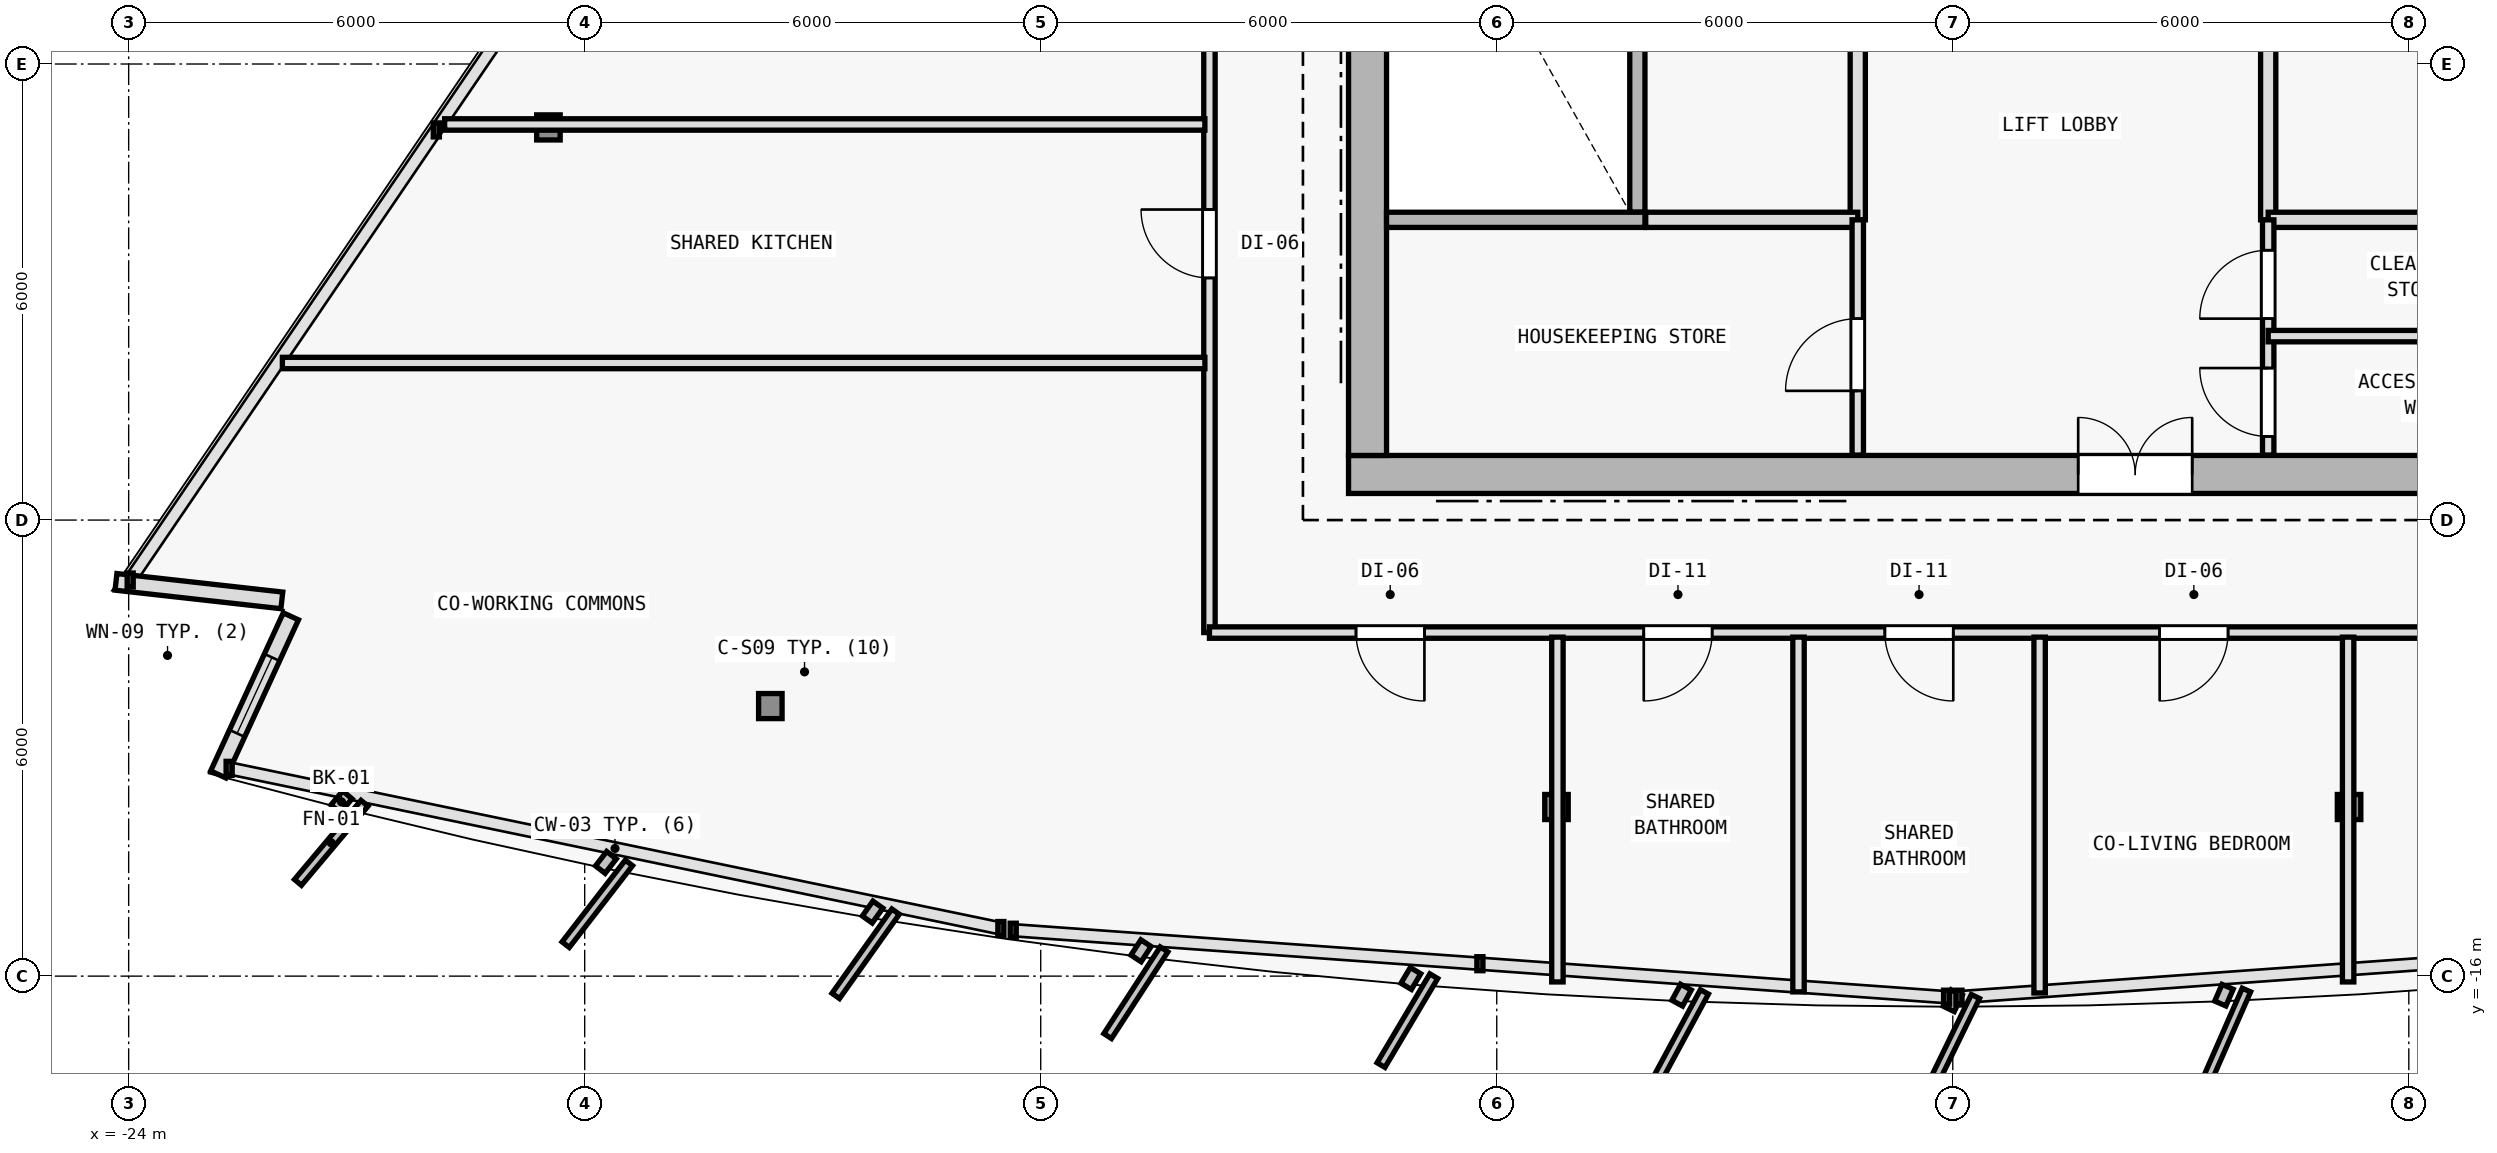
"""IFC4 building model, lengths in metres.
Left out: names, types, materials, properties, quantities, classifications, styles, units other than length and angle.
Written with IfcOpenShell. Run it as: python <this file> out.ifc"""

import sys

from ifc_helpers import new_model, si_unit, direction, frame, frame_2d, origin, origin_2d, place, context, subcontext, project, spatial, rectangle, i_section, extrude, element, fill, save


model = new_model("IFC4")
c1 = context("Model", 3, precision=1e-05, world=origin(), true_north=direction((0.0, 1.0)))
c2 = subcontext(c1, "Body", "Model", "MODEL_VIEW")
j1 = project(units=[si_unit("LENGTHUNIT", "METRE"), si_unit("PLANEANGLEUNIT", "RADIAN")], contexts=[c1])
p1 = place(None, origin())
s1 = spatial("IfcSite", under=j1, at=p1, CompositionType="ELEMENT")
p2 = place(p1, origin())
s2 = spatial("IfcBuilding", under=s1, at=p2, CompositionType="ELEMENT")
p3 = place(p2, frame((0.0, 0.0, 268.8)))
s3 = spatial("IfcBuildingStorey", under=s2, at=p3, CompositionType="ELEMENT", Elevation=268.8)
for number, where, z_axis, x_axis in (
    (1, (-7.7, -9.4, 0.0), (0.0, 0.0, 1.0), (1.0, 0.0, 0.0)),
    (2, (0.0, -9.4, 0.0), (0.0, 0.0, 1.0), (1.0, 0.0, 0.0)),
):
    element("IfcColumn", number, at=place(p3, frame(where, z_axis=z_axis, x_axis=x_axis)), inside=s3, PredefinedType="COLUMN", context=c2, shape_type="SweptSolid", body=[
        extrude(i_section(OverallWidth=0.374, OverallDepth=0.372, WebThickness=0.012, FlangeThickness=0.02, FilletRadius=0.015, at=origin_2d()), origin(), (0.0, 0.0, 1.0), 3.6),
    ])
p4 = place(p3, frame((-15.558, -12.447, 0.005), z_axis=(0.020662881976, 0.033441243198, 0.999227065567), x_axis=(-0.850707037426, 0.525640120686, 0.0)))
e3 = element("IfcColumn", 3, at=p4, inside=s3, PredefinedType="COLUMN", context=c2, shape_type="SweptSolid", body=[
    extrude(i_section(OverallWidth=0.309, OverallDepth=0.33, WebThickness=0.011, FlangeThickness=0.019, FilletRadius=0.027, at=origin_2d()), origin(), (0.0, 0.0, 1.0), 3.592),
])
for number, where, z_axis, x_axis in (
    (4, (-5.214, -13.775, 0.005), (0.007, 0.035, 0.999), (-0.981, 0.193, 0.0)),
    (5, (5.214, -13.775, 0.005), (-0.007, 0.035, 0.999), (-0.981, -0.193, 0.0)),
):
    element("IfcColumn", number, at=place(p3, frame(where, z_axis=z_axis, x_axis=x_axis)), inside=s3, PredefinedType="COLUMN", context=c2, shape_type="SweptSolid", body=[
        extrude(i_section(OverallWidth=0.309, OverallDepth=0.33, WebThickness=0.011, FlangeThickness=0.019, FilletRadius=0.027, at=origin_2d()), origin(), (0.0, 0.0, 1.0), 3.592),
    ])
p5 = place(p3, frame((-18.477, -4.834, 0.005), z_axis=(0.025222449659, 0.021619242565, 0.999448065876), x_axis=(-0.650791373456, 0.759256602365, 0.0)))
e6 = element("IfcColumn", 6, at=p5, inside=s3, PredefinedType="COLUMN", context=c2, shape_type="SweptSolid", body=[
    extrude(i_section(OverallWidth=0.309, OverallDepth=0.33, WebThickness=0.011, FlangeThickness=0.019, FilletRadius=0.027, at=origin_2d()), origin(), (0.0, 0.0, 1.0), 3.591),
])
p6 = place(p3, frame((-21.985, -11.057, 0.0), z_axis=(0.0, 0.0, 1.0), x_axis=(-0.993823926228, 0.110968480463, 0.0)))
e7 = element("IfcWall", 7, at=p6, inside=s3, PredefinedType="SOLIDWALL", context=c2, shape_type="SweptSolid", body=[
    extrude(rectangle(XDim=2.196, YDim=0.22, at=frame_2d((1.098, 0.0))), origin(), (0.0, 0.0, 1.0), 3.35),
])
p7 = place(p3, frame((-22.822, -13.347, 0.0), z_axis=(0.0, 0.0, 1.0), x_axis=(0.417447808253, 0.908700900949, 0.0)))
e8 = element("IfcWall", 8, at=p7, inside=s3, PredefinedType="SOLIDWALL", context=c2, shape_type="SweptSolid", body=[
    extrude(rectangle(XDim=2.289, YDim=0.22, at=frame_2d((1.145, 0.0))), origin(), (0.0, 0.0, 1.0), 3.35),
])
p8 = place(p7, frame((0.594, 0.0, 0.62)))
e9 = element("IfcOpeningElement", 9, at=p8, cuts=e8, PredefinedType="OPENING", context=c2, shape_type="SweptSolid", body=[
    extrude(rectangle(XDim=1.1, YDim=1.8, at=frame_2d((0.55, 0.9))), frame((0.0, 0.12, 0.0), z_axis=(0.0, -1.0, 0.0), x_axis=(1.0, 0.0, 0.0)), (0.0, 0.0, 1.0), 0.24),
])
p9 = place(p3, frame((-7.95, -9.4, 0.0), z_axis=(0.0, 0.0, 1.0), x_axis=(1.0, 0.0, 0.0)))
e10 = element("IfcWall", 10, at=p9, inside=s3, PredefinedType="SHEAR", context=c2, shape_type="SweptSolid", body=[
    extrude(rectangle(XDim=15.9, YDim=0.5, at=frame_2d((7.95, 0.0))), origin(), (0.0, 0.0, 1.0), 3.35),
])
p10 = place(p9, frame((9.6, 0.0, 0.0)))
e11 = element("IfcOpeningElement", 11, at=p10, cuts=e10, PredefinedType="OPENING", context=c2, shape_type="SweptSolid", body=[
    extrude(rectangle(XDim=1.5, YDim=2.2, at=frame_2d((0.75, 1.1))), frame((0.0, 0.26, 0.0), z_axis=(0.0, -1.0, 0.0), x_axis=(1.0, 0.0, 0.0)), (0.0, 0.0, 1.0), 0.52),
])
p11 = place(p3, frame((-7.7, -9.15, 0.0), z_axis=(0.0, 0.0, 1.0), x_axis=(0.0, 1.0, 0.0)))
e12 = element("IfcWall", 12, at=p11, inside=s3, PredefinedType="SHEAR", context=c2, shape_type="SweptSolid", body=[
    extrude(rectangle(XDim=19.1, YDim=0.5, at=frame_2d((9.55, 0.0))), origin(), (0.0, 0.0, 1.0), 3.35),
])
p12 = place(p11, frame((12.7, 0.0, 0.0)))
e13 = element("IfcOpeningElement", 13, at=p12, cuts=e12, PredefinedType="OPENING", context=c2, shape_type="SweptSolid", body=[
    extrude(rectangle(XDim=1.1, YDim=2.15, at=frame_2d((0.55, 1.075))), frame((0.0, 0.26, 0.0), z_axis=(0.0, -1.0, 0.0), x_axis=(1.0, 0.0, 0.0)), (0.0, 0.0, 1.0), 0.52),
])
p13 = place(p3, frame((-4.15, -5.95, 0.0), z_axis=(0.0, 0.0, 1.0), x_axis=(0.0, 1.0, 0.0)))
e14 = element("IfcWall", 14, at=p13, inside=s3, PredefinedType="SOLIDWALL", context=c2, shape_type="SweptSolid", body=[
    extrude(rectangle(XDim=7.2, YDim=0.2, at=frame_2d((3.6, 0.0))), origin(), (0.0, 0.0, 1.0), 3.35),
])
p14 = place(p3, frame((4.15, -6.05, 0.0), z_axis=(0.0, 0.0, 1.0), x_axis=(0.0, 1.0, 0.0)))
e15 = element("IfcWall", 15, at=p14, inside=s3, PredefinedType="SOLIDWALL", context=c2, shape_type="SweptSolid", body=[
    extrude(rectangle(XDim=8.7, YDim=0.2, at=frame_2d((4.35, 0.0))), origin(), (0.0, 0.0, 1.0), 3.35),
])
p15 = place(p14, frame((3.6, 0.0, 0.0)))
e16 = element("IfcOpeningElement", 16, at=p15, cuts=e15, PredefinedType="OPENING", context=c2, shape_type="SweptSolid", body=[
    extrude(rectangle(XDim=0.95, YDim=2.1, at=frame_2d((0.475, 1.05))), frame((0.0, 0.11, 0.0), z_axis=(0.0, -1.0, 0.0), x_axis=(1.0, 0.0, 0.0)), (0.0, 0.0, 1.0), 0.22),
])
p16 = place(p3, frame((-1.25, -6.05, 0.0), z_axis=(0.0, 0.0, 1.0), x_axis=(0.0, 1.0, 0.0)))
e17 = element("IfcWall", 17, at=p16, inside=s3, PredefinedType="SOLIDWALL", context=c2, shape_type="SweptSolid", body=[
    extrude(rectangle(XDim=8.7, YDim=0.2, at=frame_2d((4.35, 0.0))), origin(), (0.0, 0.0, 1.0), 3.35),
])
p17 = place(p16, frame((3.4, 0.0, 0.0)))
e18 = element("IfcOpeningElement", 18, at=p17, cuts=e17, PredefinedType="OPENING", context=c2, shape_type="SweptSolid", body=[
    extrude(rectangle(XDim=0.95, YDim=2.1, at=frame_2d((0.475, 1.05))), frame((0.0, 0.11, 0.0), z_axis=(0.0, -1.0, 0.0), x_axis=(1.0, 0.0, 0.0)), (0.0, 0.0, 1.0), 0.22),
])
p18 = place(p3, frame((-7.45, -6.05, 0.0), z_axis=(0.0, 0.0, 1.0), x_axis=(1.0, 0.0, 0.0)))
e19 = element("IfcWall", 19, at=p18, inside=s3, PredefinedType="SOLIDWALL", context=c2, shape_type="SweptSolid", body=[
    extrude(rectangle(XDim=3.4, YDim=0.2, at=frame_2d((1.7, 0.0))), origin(), (0.0, 0.0, 1.0), 3.35),
])
p19 = place(p3, frame((-4.04, -6.05, 0.0), z_axis=(0.0, 0.0, 1.0), x_axis=(1.0, 0.0, 0.0)))
e20 = element("IfcWall", 20, at=p19, inside=s3, PredefinedType="SOLIDWALL", context=c2, shape_type="SweptSolid", body=[
    extrude(rectangle(XDim=2.79, YDim=0.2, at=frame_2d((1.395, 0.0))), origin(), (0.0, 0.0, 1.0), 3.35),
])
p20 = place(p3, frame((4.15, -6.05, 0.0), z_axis=(0.0, 0.0, 1.0), x_axis=(1.0, 0.0, 0.0)))
e21 = element("IfcWall", 21, at=p20, inside=s3, PredefinedType="SOLIDWALL", context=c2, shape_type="SweptSolid", body=[
    extrude(rectangle(XDim=3.295, YDim=0.2, at=frame_2d((1.647, 0.0))), origin(), (0.0, 0.0, 1.0), 3.35),
])
p21 = place(p3, frame((-1.25, -9.145, 0.0), z_axis=(0.0, 0.0, 1.0), x_axis=(0.0, 1.0, 0.0)))
e22 = element("IfcWall", 22, at=p21, inside=s3, PredefinedType="PARTITIONING", context=c2, shape_type="SweptSolid", body=[
    extrude(rectangle(XDim=3.095, YDim=0.15, at=frame_2d((1.547, 0.0))), origin(), (0.0, 0.0, 1.0), 3.35),
])
p22 = place(p21, frame((0.845, 0.0, 0.0)))
e23 = element("IfcOpeningElement", 23, at=p22, cuts=e22, PredefinedType="OPENING", context=c2, shape_type="SweptSolid", body=[
    extrude(rectangle(XDim=0.95, YDim=2.1, at=frame_2d((0.475, 1.05))), frame((0.0, 0.085, 0.0), z_axis=(0.0, -1.0, 0.0), x_axis=(1.0, 0.0, 0.0)), (0.0, 0.0, 1.0), 0.17),
])
p23 = place(p3, frame((4.15, -9.145, 0.0), z_axis=(0.0, 0.0, 1.0), x_axis=(0.0, 1.0, 0.0)))
e24 = element("IfcWall", 24, at=p23, inside=s3, PredefinedType="PARTITIONING", context=c2, shape_type="SweptSolid", body=[
    extrude(rectangle(XDim=3.095, YDim=0.15, at=frame_2d((1.547, 0.0))), origin(), (0.0, 0.0, 1.0), 3.35),
])
p24 = place(p23, frame((0.245, 0.0, 0.0)))
e25 = element("IfcOpeningElement", 25, at=p24, cuts=e24, PredefinedType="OPENING", context=c2, shape_type="SweptSolid", body=[
    extrude(rectangle(XDim=0.9, YDim=2.1, at=frame_2d((0.45, 1.05))), frame((0.0, 0.085, 0.0), z_axis=(0.0, -1.0, 0.0), x_axis=(1.0, 0.0, 0.0)), (0.0, 0.0, 1.0), 0.17),
])
p25 = place(p23, frame((1.795, 0.0, 0.0)))
e26 = element("IfcOpeningElement", 26, at=p25, cuts=e24, PredefinedType="OPENING", context=c2, shape_type="SweptSolid", body=[
    extrude(rectangle(XDim=0.9, YDim=2.1, at=frame_2d((0.45, 1.05))), frame((0.0, 0.085, 0.0), z_axis=(0.0, -1.0, 0.0), x_axis=(1.0, 0.0, 0.0)), (0.0, 0.0, 1.0), 0.17),
])
p26 = place(p3, frame((4.15, -7.58, 0.0), z_axis=(0.0, 0.0, 1.0), x_axis=(1.0, 0.0, 0.0)))
e27 = element("IfcWall", 27, at=p26, inside=s3, PredefinedType="PARTITIONING", context=c2, shape_type="SweptSolid", body=[
    extrude(rectangle(XDim=3.295, YDim=0.15, at=frame_2d((1.647, 0.0))), origin(), (0.0, 0.0, 1.0), 3.35),
])
p27 = place(p3, frame((-9.78, -11.48, 0.0), z_axis=(0.0, 0.0, 1.0), x_axis=(0.0, 1.0, 0.0)))
e28 = element("IfcWall", 28, at=p27, inside=s3, PredefinedType="PARTITIONING", context=c2, shape_type="SweptSolid", body=[
    extrude(rectangle(XDim=19.706, YDim=0.15, at=frame_2d((9.853, 0.0))), origin(), (0.0, 0.0, 1.0), 2.725),
])
p28 = place(p27, frame((4.666, 0.0, 0.0)))
e29 = element("IfcOpeningElement", 29, at=p28, cuts=e28, PredefinedType="OPENING", context=c2, shape_type="SweptSolid", body=[
    extrude(rectangle(XDim=0.9, YDim=2.1, at=frame_2d((0.45, 1.05))), frame((0.0, 0.085, 0.0), z_axis=(0.0, -1.0, 0.0), x_axis=(1.0, 0.0, 0.0)), (0.0, 0.0, 1.0), 0.17),
])
p29 = place(p3, frame((9.78, -11.48, 0.0), z_axis=(0.0, 0.0, 1.0), x_axis=(-1.0, 0.0, 0.0)))
e30 = element("IfcWall", 30, at=p29, inside=s3, PredefinedType="PARTITIONING", context=c2, shape_type="SweptSolid", body=[
    extrude(rectangle(XDim=19.56, YDim=0.15, at=frame_2d((9.78, 0.0))), origin(), (0.0, 0.0, 1.0), 2.725),
])
p30 = place(p29, frame((16.732, 0.0, 0.0)))
e31 = element("IfcOpeningElement", 31, at=p30, cuts=e30, PredefinedType="OPENING", context=c2, shape_type="SweptSolid", body=[
    extrude(rectangle(XDim=0.9, YDim=2.1, at=frame_2d((0.45, 1.05))), frame((0.0, 0.085, 0.0), z_axis=(0.0, -1.0, 0.0), x_axis=(1.0, 0.0, 0.0)), (0.0, 0.0, 1.0), 0.17),
])
p31 = place(p29, frame((12.946, 0.0, 0.0)))
e32 = element("IfcOpeningElement", 32, at=p31, cuts=e30, PredefinedType="OPENING", context=c2, shape_type="SweptSolid", body=[
    extrude(rectangle(XDim=0.9, YDim=2.1, at=frame_2d((0.45, 1.05))), frame((0.0, 0.085, 0.0), z_axis=(0.0, -1.0, 0.0), x_axis=(1.0, 0.0, 0.0)), (0.0, 0.0, 1.0), 0.17),
])
p32 = place(p29, frame((9.774, 0.0, 0.0)))
e33 = element("IfcOpeningElement", 33, at=p32, cuts=e30, PredefinedType="OPENING", context=c2, shape_type="SweptSolid", body=[
    extrude(rectangle(XDim=0.9, YDim=2.1, at=frame_2d((0.45, 1.05))), frame((0.0, 0.085, 0.0), z_axis=(0.0, -1.0, 0.0), x_axis=(1.0, 0.0, 0.0)), (0.0, 0.0, 1.0), 0.17),
])
p33 = place(p29, frame((6.158, 0.0, 0.0)))
e34 = element("IfcOpeningElement", 34, at=p33, cuts=e30, PredefinedType="OPENING", context=c2, shape_type="SweptSolid", body=[
    extrude(rectangle(XDim=0.9, YDim=2.1, at=frame_2d((0.45, 1.05))), frame((0.0, 0.085, 0.0), z_axis=(0.0, -1.0, 0.0), x_axis=(1.0, 0.0, 0.0)), (0.0, 0.0, 1.0), 0.17),
])
p34 = place(p29, frame((1.928, 0.0, 0.0)))
e35 = element("IfcOpeningElement", 35, at=p34, cuts=e30, PredefinedType="OPENING", context=c2, shape_type="SweptSolid", body=[
    extrude(rectangle(XDim=0.9, YDim=2.1, at=frame_2d((0.45, 1.05))), frame((0.0, 0.085, 0.0), z_axis=(0.0, -1.0, 0.0), x_axis=(1.0, 0.0, 0.0)), (0.0, 0.0, 1.0), 0.17),
])
p35 = place(p3, frame((-5.202, -11.54, 0.0), z_axis=(0.0, 0.0, 1.0), x_axis=(0.0, -1.0, 0.0)))
e36 = element("IfcWall", 36, at=p35, inside=s3, PredefinedType="PARTITIONING", context=c2, shape_type="SweptSolid", body=[
    extrude(rectangle(XDim=4.536, YDim=0.15, at=frame_2d((2.268, 0.0))), origin(), (0.0, 0.0, 1.0), 2.725),
])
p36 = place(p3, frame((5.202, -11.54, 0.0), z_axis=(0.0, 0.0, 1.0), x_axis=(0.0, -1.0, 0.0)))
e37 = element("IfcWall", 37, at=p36, inside=s3, PredefinedType="PARTITIONING", context=c2, shape_type="SweptSolid", body=[
    extrude(rectangle(XDim=4.536, YDim=0.15, at=frame_2d((2.268, 0.0))), origin(), (0.0, 0.0, 1.0), 2.875),
])
p37 = place(p3, frame((-9.84, -4.795, 0.0), z_axis=(0.0, 0.0, 1.0), x_axis=(-1.0, 0.0, 0.0)))
e38 = element("IfcWall", 38, at=p37, inside=s3, PredefinedType="PARTITIONING", context=c2, shape_type="SweptSolid", body=[
    extrude(rectangle(XDim=10.002, YDim=0.15, at=frame_2d((5.001, 0.0))), origin(), (0.0, 0.0, 1.0), 2.725),
])
p38 = place(p3, frame((1.143, -11.54, 0.0), z_axis=(0.0, 0.0, 1.0), x_axis=(0.0, -1.0, 0.0)))
e39 = element("IfcWall", 39, at=p38, inside=s3, PredefinedType="PARTITIONING", context=c2, shape_type="SweptSolid", body=[
    extrude(rectangle(XDim=4.681, YDim=0.15, at=frame_2d((2.341, 0.0))), origin(), (0.0, 0.0, 1.0), 2.825),
])
p39 = place(p3, frame((-9.84, -7.934, 0.0), z_axis=(0.0, 0.0, 1.0), x_axis=(-1.0, 0.0, 0.0)))
e40 = element("IfcWall", 40, at=p39, inside=s3, PredefinedType="PARTITIONING", context=c2, shape_type="SweptSolid", body=[
    extrude(rectangle(XDim=12.137, YDim=0.15, at=frame_2d((6.069, 0.0))), origin(), (0.0, 0.0, 1.0), 2.775),
])
p40 = place(p3, frame((-2.03, -11.54, 0.0), z_axis=(0.0, 0.0, 1.0), x_axis=(0.0, -1.0, 0.0)))
e41 = element("IfcWall", 41, at=p40, inside=s3, PredefinedType="PARTITIONING", context=c2, shape_type="SweptSolid", body=[
    extrude(rectangle(XDim=4.667, YDim=0.15, at=frame_2d((2.333, 0.0))), origin(), (0.0, 0.0, 1.0), 2.825),
])
p41 = place(p8, origin())
e42 = element("IfcWindow", 42, at=p41, inside=s3, PartitioningType="SINGLE_PANEL", PredefinedType="WINDOW", context=c2, shape_type="SweptSolid", body=[
    extrude(rectangle(XDim=1.1, YDim=1.8, at=frame_2d((0.55, 0.9))), frame((0.0, 0.03, 0.0), z_axis=(0.0, -1.0, 0.0), x_axis=(1.0, 0.0, 0.0)), (0.0, 0.0, 1.0), 0.06),
])
fill(e9, e42)
p42 = place(p10, origin())
e43 = element("IfcDoor", 43, at=p42, inside=s3, OperationType="DOUBLE_DOOR_SINGLE_SWING", PredefinedType="DOOR", context=c2, shape_type="SweptSolid", body=[
    extrude(rectangle(XDim=1.5, YDim=2.2, at=frame_2d((0.75, 1.1))), frame((0.0, 0.025, 0.0), z_axis=(0.0, -1.0, 0.0), x_axis=(1.0, 0.0, 0.0)), (0.0, 0.0, 1.0), 0.05),
])
fill(e11, e43)
p43 = place(p22, origin())
e44 = element("IfcDoor", 44, at=p43, inside=s3, OperationType="SINGLE_SWING_LEFT", PredefinedType="DOOR", context=c2, shape_type="SweptSolid", body=[
    extrude(rectangle(XDim=0.95, YDim=2.1, at=frame_2d((0.475, 1.05))), frame((0.0, 0.025, 0.0), z_axis=(0.0, -1.0, 0.0), x_axis=(1.0, 0.0, 0.0)), (0.0, 0.0, 1.0), 0.05),
])
fill(e23, e44)
p44 = place(p24, origin())
e45 = element("IfcDoor", 45, at=p44, inside=s3, OperationType="SINGLE_SWING_RIGHT", PredefinedType="DOOR", context=c2, shape_type="SweptSolid", body=[
    extrude(rectangle(XDim=0.9, YDim=2.1, at=frame_2d((0.45, 1.05))), frame((0.0, 0.025, 0.0), z_axis=(0.0, -1.0, 0.0), x_axis=(1.0, 0.0, 0.0)), (0.0, 0.0, 1.0), 0.05),
])
fill(e25, e45)
p45 = place(p25, origin())
e46 = element("IfcDoor", 46, at=p45, inside=s3, OperationType="SINGLE_SWING_LEFT", PredefinedType="DOOR", context=c2, shape_type="SweptSolid", body=[
    extrude(rectangle(XDim=0.9, YDim=2.1, at=frame_2d((0.45, 1.05))), frame((0.0, 0.025, 0.0), z_axis=(0.0, -1.0, 0.0), x_axis=(1.0, 0.0, 0.0)), (0.0, 0.0, 1.0), 0.05),
])
fill(e26, e46)
p46 = place(p28, origin())
e47 = element("IfcDoor", 47, at=p46, inside=s3, OperationType="SINGLE_SWING_RIGHT", PredefinedType="DOOR", context=c2, shape_type="SweptSolid", body=[
    extrude(rectangle(XDim=0.9, YDim=2.1, at=frame_2d((0.45, 1.05))), frame((0.0, 0.025, 0.0), z_axis=(0.0, -1.0, 0.0), x_axis=(1.0, 0.0, 0.0)), (0.0, 0.0, 1.0), 0.05),
])
fill(e29, e47)
p47 = place(p30, origin())
e48 = element("IfcDoor", 48, at=p47, inside=s3, OperationType="SINGLE_SWING_LEFT", PredefinedType="DOOR", context=c2, shape_type="SweptSolid", body=[
    extrude(rectangle(XDim=0.9, YDim=2.1, at=frame_2d((0.45, 1.05))), frame((0.0, 0.025, 0.0), z_axis=(0.0, -1.0, 0.0), x_axis=(1.0, 0.0, 0.0)), (0.0, 0.0, 1.0), 0.05),
])
fill(e31, e48)
p48 = place(p31, origin())
e49 = element("IfcDoor", 49, at=p48, inside=s3, OperationType="SINGLE_SWING_RIGHT", PredefinedType="DOOR", context=c2, shape_type="SweptSolid", body=[
    extrude(rectangle(XDim=0.9, YDim=2.1, at=frame_2d((0.45, 1.05))), frame((0.0, 0.025, 0.0), z_axis=(0.0, -1.0, 0.0), x_axis=(1.0, 0.0, 0.0)), (0.0, 0.0, 1.0), 0.05),
])
fill(e32, e49)
p49 = place(p32, origin())
e50 = element("IfcDoor", 50, at=p49, inside=s3, OperationType="SINGLE_SWING_LEFT", PredefinedType="DOOR", context=c2, shape_type="SweptSolid", body=[
    extrude(rectangle(XDim=0.9, YDim=2.1, at=frame_2d((0.45, 1.05))), frame((0.0, 0.025, 0.0), z_axis=(0.0, -1.0, 0.0), x_axis=(1.0, 0.0, 0.0)), (0.0, 0.0, 1.0), 0.05),
])
fill(e33, e50)
p50 = place(p33, origin())
e51 = element("IfcDoor", 51, at=p50, inside=s3, OperationType="SINGLE_SWING_RIGHT", PredefinedType="DOOR", context=c2, shape_type="SweptSolid", body=[
    extrude(rectangle(XDim=0.9, YDim=2.1, at=frame_2d((0.45, 1.05))), frame((0.0, 0.025, 0.0), z_axis=(0.0, -1.0, 0.0), x_axis=(1.0, 0.0, 0.0)), (0.0, 0.0, 1.0), 0.05),
])
fill(e34, e51)
save(model, sys.argv[1])
